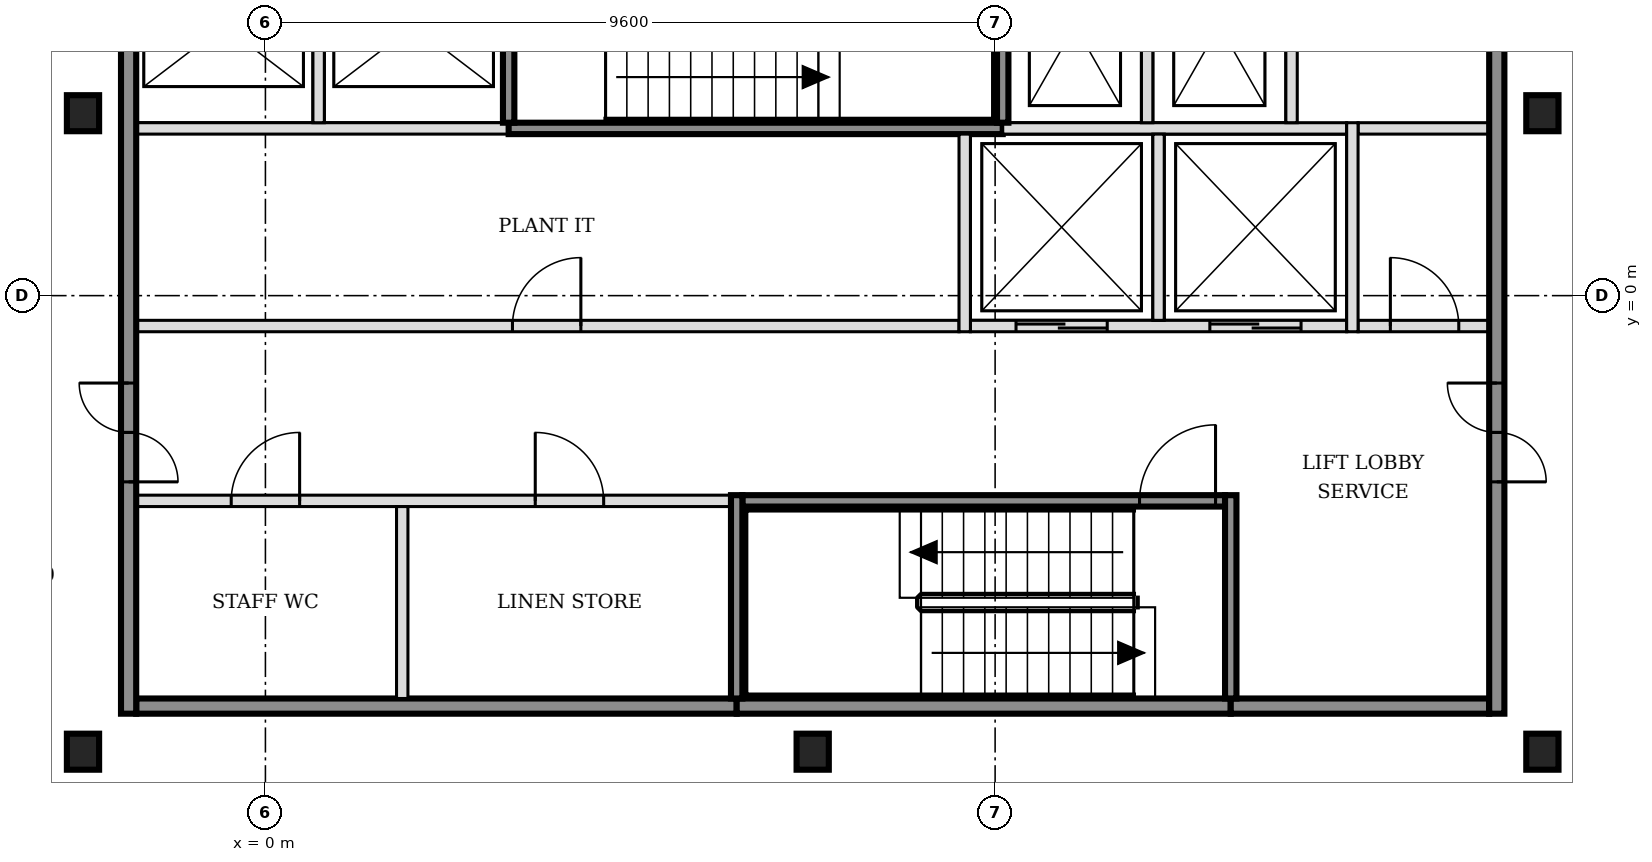
"""IFC4 building model, lengths in metres.
Left out: names, types, materials, properties, quantities, classifications, styles, units other than length and angle.
Written with IfcOpenShell. Run it as: python <this file> out.ifc"""

import sys

from ifc_helpers import new_model, si_unit, direction, frame, frame_2d, origin, origin_2d, place, context, subcontext, project, spatial, rectangle, i_section, extrude, element, fill, save


model = new_model("IFC4")
c1 = context("Model", 3, precision=1e-05, world=origin(), true_north=direction((0.0, 1.0)))
c2 = subcontext(c1, "Body", "Model", "MODEL_VIEW")
j1 = project(units=[si_unit("LENGTHUNIT", "METRE"), si_unit("PLANEANGLEUNIT", "RADIAN")], contexts=[c1])
p1 = place(None, origin())
s1 = spatial("IfcSite", under=j1, at=p1, CompositionType="ELEMENT")
p2 = place(p1, origin())
s2 = spatial("IfcBuilding", under=s1, at=p2, CompositionType="ELEMENT")
p3 = place(p2, frame((0.0, 0.0, 143.4)))
s3 = spatial("IfcBuildingStorey", under=s2, at=p3, CompositionType="ELEMENT", Elevation=143.4)
for number, where, z_axis, x_axis in (
    (1, (-2.4, -6.0, -0.15), (0.0, 0.0, 1.0), (1.0, 0.0, 0.0)),
    (2, (7.2, -6.0, -0.15), (0.0, 0.0, 1.0), (1.0, 0.0, 0.0)),
    (3, (16.8, -6.0, -0.15), (0.0, 0.0, 1.0), (1.0, 0.0, 0.0)),
    (4, (-2.4, 2.4, -0.15), (0.0, 0.0, 1.0), (1.0, 0.0, 0.0)),
    (5, (16.8, 2.4, -0.15), (0.0, 0.0, 1.0), (1.0, 0.0, 0.0)),
):
    element("IfcColumn", number, at=place(p3, frame(where, z_axis=z_axis, x_axis=x_axis)), inside=s3, PredefinedType="COLUMN", context=c2, shape_type="SweptSolid", body=[
        extrude(i_section(OverallWidth=0.424, OverallDepth=0.474, WebThickness=0.048, FlangeThickness=0.077, FilletRadius=0.015, at=origin_2d()), origin(), (0.0, 0.0, 1.0), 3.6),
    ])
p4 = place(p3, frame((-1.7, -5.4, 0.0), z_axis=(0.0, 0.0, 1.0), x_axis=(1.0, 0.0, 0.0)))
e6 = element("IfcWall", 6, at=p4, inside=s3, PredefinedType="SOLIDWALL", context=c2, shape_type="SweptSolid", body=[
    extrude(rectangle(XDim=7.9, YDim=0.2, at=frame_2d((3.95, 0.0))), origin(), (0.0, 0.0, 1.0), 3.45),
])
p5 = place(p3, frame((6.2, -5.4, 0.0), z_axis=(0.0, 0.0, 1.0), x_axis=(1.0, 0.0, 0.0)))
e7 = element("IfcWall", 7, at=p5, inside=s3, PredefinedType="SOLIDWALL", context=c2, shape_type="SweptSolid", body=[
    extrude(rectangle(XDim=6.5, YDim=0.2, at=frame_2d((3.25, 0.0))), origin(), (0.0, 0.0, 1.0), 3.45),
])
p6 = place(p3, frame((12.7, -5.4, 0.0), z_axis=(0.0, 0.0, 1.0), x_axis=(1.0, 0.0, 0.0)))
e8 = element("IfcWall", 8, at=p6, inside=s3, PredefinedType="SOLIDWALL", context=c2, shape_type="SweptSolid", body=[
    extrude(rectangle(XDim=3.4, YDim=0.2, at=frame_2d((1.7, 0.0))), origin(), (0.0, 0.0, 1.0), 3.45),
])
p7 = place(p3, frame((-1.7, -2.7, 0.0), z_axis=(0.0, 0.0, 1.0), x_axis=(1.0, 0.0, 0.0)))
e9 = element("IfcWall", 9, at=p7, inside=s3, PredefinedType="PARTITIONING", context=c2, shape_type="SweptSolid", body=[
    extrude(rectangle(XDim=7.825, YDim=0.15, at=frame_2d((3.913, 0.0))), origin(), (0.0, 0.0, 1.0), 3.45),
])
p8 = place(p7, frame((1.25, 0.0, 0.0)))
e10 = element("IfcOpeningElement", 10, at=p8, cuts=e9, PredefinedType="OPENING", context=c2, shape_type="SweptSolid", body=[
    extrude(rectangle(XDim=0.9, YDim=2.1, at=frame_2d((0.45, 1.05))), frame((0.0, 0.085, 0.0), z_axis=(0.0, -1.0, 0.0), x_axis=(1.0, 0.0, 0.0)), (0.0, 0.0, 1.0), 0.17),
])
p9 = place(p7, frame((5.25, 0.0, 0.0)))
e11 = element("IfcOpeningElement", 11, at=p9, cuts=e9, PredefinedType="OPENING", context=c2, shape_type="SweptSolid", body=[
    extrude(rectangle(XDim=0.9, YDim=2.1, at=frame_2d((0.45, 1.05))), frame((0.0, 0.085, 0.0), z_axis=(0.0, -1.0, 0.0), x_axis=(1.0, 0.0, 0.0)), (0.0, 0.0, 1.0), 0.17),
])
p10 = place(p3, frame((6.275, -2.7, 0.0), z_axis=(0.0, 0.0, 1.0), x_axis=(1.0, 0.0, 0.0)))
e12 = element("IfcWall", 12, at=p10, inside=s3, PredefinedType="SOLIDWALL", context=c2, shape_type="SweptSolid", body=[
    extrude(rectangle(XDim=6.35, YDim=0.15, at=frame_2d((3.175, 0.0))), origin(), (0.0, 0.0, 1.0), 3.45),
])
p11 = place(p10, frame((5.225, 0.0, 0.0)))
e13 = element("IfcOpeningElement", 13, at=p11, cuts=e12, PredefinedType="OPENING", context=c2, shape_type="SweptSolid", body=[
    extrude(rectangle(XDim=1.0, YDim=2.1, at=frame_2d((0.5, 1.05))), frame((0.0, 0.085, 0.0), z_axis=(0.0, -1.0, 0.0), x_axis=(1.0, 0.0, 0.0)), (0.0, 0.0, 1.0), 0.17),
])
p12 = place(p3, frame((-1.7, -0.4, 0.0), z_axis=(0.0, 0.0, 1.0), x_axis=(1.0, 0.0, 0.0)))
e14 = element("IfcWall", 14, at=p12, inside=s3, PredefinedType="PARTITIONING", context=c2, shape_type="SweptSolid", body=[
    extrude(rectangle(XDim=10.825, YDim=0.15, at=frame_2d((5.413, 0.0))), origin(), (0.0, 0.0, 1.0), 3.45),
])
p13 = place(p12, frame((4.95, 0.0, 0.0)))
e15 = element("IfcOpeningElement", 15, at=p13, cuts=e14, PredefinedType="OPENING", context=c2, shape_type="SweptSolid", body=[
    extrude(rectangle(XDim=0.9, YDim=2.1, at=frame_2d((0.45, 1.05))), frame((0.0, 0.085, 0.0), z_axis=(0.0, -1.0, 0.0), x_axis=(1.0, 0.0, 0.0)), (0.0, 0.0, 1.0), 0.17),
])
p14 = place(p3, frame((9.275, -0.4, 0.0), z_axis=(0.0, 0.0, 1.0), x_axis=(1.0, 0.0, 0.0)))
e16 = element("IfcWall", 16, at=p14, inside=s3, PredefinedType="SOLIDWALL", context=c2, shape_type="SweptSolid", body=[
    extrude(rectangle(XDim=4.95, YDim=0.15, at=frame_2d((2.475, 0.0))), origin(), (0.0, 0.0, 1.0), 3.45),
])
p15 = place(p14, frame((0.6, 0.0, 0.0)))
e17 = element("IfcOpeningElement", 17, at=p15, cuts=e16, PredefinedType="OPENING", context=c2, shape_type="SweptSolid", body=[
    extrude(rectangle(XDim=1.2, YDim=2.1, at=frame_2d((0.6, 1.05))), frame((0.0, 0.085, 0.0), z_axis=(0.0, -1.0, 0.0), x_axis=(1.0, 0.0, 0.0)), (0.0, 0.0, 1.0), 0.17),
])
p16 = place(p14, frame((3.15, 0.0, 0.0)))
e18 = element("IfcOpeningElement", 18, at=p16, cuts=e16, PredefinedType="OPENING", context=c2, shape_type="SweptSolid", body=[
    extrude(rectangle(XDim=1.2, YDim=2.1, at=frame_2d((0.6, 1.05))), frame((0.0, 0.085, 0.0), z_axis=(0.0, -1.0, 0.0), x_axis=(1.0, 0.0, 0.0)), (0.0, 0.0, 1.0), 0.17),
])
p17 = place(p3, frame((14.375, -0.4, 0.0), z_axis=(0.0, 0.0, 1.0), x_axis=(1.0, 0.0, 0.0)))
e19 = element("IfcWall", 19, at=p17, inside=s3, PredefinedType="PARTITIONING", context=c2, shape_type="SweptSolid", body=[
    extrude(rectangle(XDim=1.725, YDim=0.15, at=frame_2d((0.863, 0.0))), origin(), (0.0, 0.0, 1.0), 3.45),
])
p18 = place(p17, frame((0.425, 0.0, 0.0)))
e20 = element("IfcOpeningElement", 20, at=p18, cuts=e19, PredefinedType="OPENING", context=c2, shape_type="SweptSolid", body=[
    extrude(rectangle(XDim=0.9, YDim=2.1, at=frame_2d((0.45, 1.05))), frame((0.0, 0.085, 0.0), z_axis=(0.0, -1.0, 0.0), x_axis=(1.0, 0.0, 0.0)), (0.0, 0.0, 1.0), 0.17),
])
p19 = place(p3, frame((-1.7, 2.2, 0.0), z_axis=(0.0, 0.0, 1.0), x_axis=(1.0, 0.0, 0.0)))
e21 = element("IfcWall", 21, at=p19, inside=s3, PredefinedType="SOLIDWALL", context=c2, shape_type="SweptSolid", body=[
    extrude(rectangle(XDim=4.9, YDim=0.15, at=frame_2d((2.45, 0.0))), origin(), (0.0, 0.0, 1.0), 3.45),
])
p20 = place(p3, frame((3.2, 2.2, 0.0), z_axis=(0.0, 0.0, 1.0), x_axis=(1.0, 0.0, 0.0)))
e22 = element("IfcWall", 22, at=p20, inside=s3, PredefinedType="SOLIDWALL", context=c2, shape_type="SweptSolid", body=[
    extrude(rectangle(XDim=6.5, YDim=0.15, at=frame_2d((3.25, 0.0))), origin(), (0.0, 0.0, 1.0), 3.45),
])
p21 = place(p3, frame((9.7, 2.2, 0.0), z_axis=(0.0, 0.0, 1.0), x_axis=(1.0, 0.0, 0.0)))
e23 = element("IfcWall", 23, at=p21, inside=s3, PredefinedType="SOLIDWALL", context=c2, shape_type="SweptSolid", body=[
    extrude(rectangle(XDim=4.525, YDim=0.15, at=frame_2d((2.263, 0.0))), origin(), (0.0, 0.0, 1.0), 3.45),
])
p22 = place(p3, frame((14.375, 2.2, 0.0), z_axis=(0.0, 0.0, 1.0), x_axis=(1.0, 0.0, 0.0)))
e24 = element("IfcWall", 24, at=p22, inside=s3, PredefinedType="PARTITIONING", context=c2, shape_type="SweptSolid", body=[
    extrude(rectangle(XDim=1.725, YDim=0.15, at=frame_2d((0.863, 0.0))), origin(), (0.0, 0.0, 1.0), 3.45),
])
p23 = place(p3, frame((-1.8, -5.5, 0.0), z_axis=(0.0, 0.0, 1.0), x_axis=(0.0, 1.0, 0.0)))
e25 = element("IfcWall", 25, at=p23, inside=s3, PredefinedType="SOLIDWALL", context=c2, shape_type="SweptSolid", body=[
    extrude(rectangle(XDim=15.8, YDim=0.2, at=frame_2d((7.9, 0.0))), origin(), (0.0, 0.0, 1.0), 3.45),
])
p24 = place(p23, frame((3.05, 0.0, 0.0)))
e26 = element("IfcOpeningElement", 26, at=p24, cuts=e25, PredefinedType="OPENING", context=c2, shape_type="SweptSolid", body=[
    extrude(rectangle(XDim=1.3, YDim=2.1, at=frame_2d((0.65, 1.05))), frame((0.0, 0.11, 0.0), z_axis=(0.0, -1.0, 0.0), x_axis=(1.0, 0.0, 0.0)), (0.0, 0.0, 1.0), 0.22),
])
p25 = place(p23, frame((11.45, 0.0, 0.0)))
e27 = element("IfcOpeningElement", 27, at=p25, cuts=e25, PredefinedType="OPENING", context=c2, shape_type="SweptSolid", body=[
    extrude(rectangle(XDim=1.3, YDim=2.1, at=frame_2d((0.65, 1.05))), frame((0.0, 0.11, 0.0), z_axis=(0.0, -1.0, 0.0), x_axis=(1.0, 0.0, 0.0)), (0.0, 0.0, 1.0), 0.22),
])
p26 = place(p3, frame((0.7, 2.275, 0.0), z_axis=(0.0, 0.0, 1.0), x_axis=(0.0, 1.0, 0.0)))
e28 = element("IfcWall", 28, at=p26, inside=s3, PredefinedType="SOLIDWALL", context=c2, shape_type="SweptSolid", body=[
    extrude(rectangle(XDim=2.55, YDim=0.15, at=frame_2d((1.275, 0.0))), origin(), (0.0, 0.0, 1.0), 3.45),
])
p27 = place(p3, frame((1.8, -5.3, 0.0), z_axis=(0.0, 0.0, 1.0), x_axis=(0.0, 1.0, 0.0)))
e29 = element("IfcWall", 29, at=p27, inside=s3, PredefinedType="PARTITIONING", context=c2, shape_type="SweptSolid", body=[
    extrude(rectangle(XDim=2.525, YDim=0.15, at=frame_2d((1.263, 0.0))), origin(), (0.0, 0.0, 1.0), 3.45),
])
p28 = place(p3, frame((3.2, 2.275, 0.0), z_axis=(0.0, 0.0, 1.0), x_axis=(0.0, 1.0, 0.0)))
e30 = element("IfcWall", 30, at=p28, inside=s3, PredefinedType="SOLIDWALL", context=c2, shape_type="SweptSolid", body=[
    extrude(rectangle(XDim=2.55, YDim=0.15, at=frame_2d((1.275, 0.0))), origin(), (0.0, 0.0, 1.0), 3.45),
])
p29 = place(p3, frame((6.2, -5.3, 0.0), z_axis=(0.0, 0.0, 1.0), x_axis=(0.0, 1.0, 0.0)))
e31 = element("IfcWall", 31, at=p29, inside=s3, PredefinedType="SOLIDWALL", context=c2, shape_type="SweptSolid", body=[
    extrude(rectangle(XDim=2.675, YDim=0.15, at=frame_2d((1.337, 0.0))), origin(), (0.0, 0.0, 1.0), 3.45),
])
p30 = place(p3, frame((9.2, -0.475, 0.0), z_axis=(0.0, 0.0, 1.0), x_axis=(0.0, 1.0, 0.0)))
e32 = element("IfcWall", 32, at=p30, inside=s3, PredefinedType="SOLIDWALL", context=c2, shape_type="SweptSolid", body=[
    extrude(rectangle(XDim=2.6, YDim=0.15, at=frame_2d((1.3, 0.0))), origin(), (0.0, 0.0, 1.0), 3.45),
])
for number, where, z_axis, x_axis in (
    (33, (9.7, 2.275, 0.0), (0.0, 0.0, 1.0), (0.0, 1.0, 0.0)),
    (34, (11.6, 2.275, 0.0), (0.0, 0.0, 1.0), (0.0, 1.0, 0.0)),
):
    element("IfcWall", number, at=place(p3, frame(where, z_axis=z_axis, x_axis=x_axis)), inside=s3, PredefinedType="SOLIDWALL", context=c2, shape_type="SweptSolid", body=[
        extrude(rectangle(XDim=2.55, YDim=0.15, at=frame_2d((1.275, 0.0))), origin(), (0.0, 0.0, 1.0), 3.45),
    ])
p31 = place(p3, frame((11.75, -0.325, 0.0), z_axis=(0.0, 0.0, 1.0), x_axis=(0.0, 1.0, 0.0)))
e35 = element("IfcWall", 35, at=p31, inside=s3, PredefinedType="SOLIDWALL", context=c2, shape_type="SweptSolid", body=[
    extrude(rectangle(XDim=2.45, YDim=0.15, at=frame_2d((1.225, 0.0))), origin(), (0.0, 0.0, 1.0), 3.45),
])
p32 = place(p3, frame((12.7, -5.3, 0.0), z_axis=(0.0, 0.0, 1.0), x_axis=(0.0, 1.0, 0.0)))
e36 = element("IfcWall", 36, at=p32, inside=s3, PredefinedType="SOLIDWALL", context=c2, shape_type="SweptSolid", body=[
    extrude(rectangle(XDim=2.675, YDim=0.15, at=frame_2d((1.337, 0.0))), origin(), (0.0, 0.0, 1.0), 3.45),
])
p33 = place(p3, frame((13.5, 2.275, 0.0), z_axis=(0.0, 0.0, 1.0), x_axis=(0.0, 1.0, 0.0)))
e37 = element("IfcWall", 37, at=p33, inside=s3, PredefinedType="SOLIDWALL", context=c2, shape_type="SweptSolid", body=[
    extrude(rectangle(XDim=2.55, YDim=0.15, at=frame_2d((1.275, 0.0))), origin(), (0.0, 0.0, 1.0), 3.45),
])
p34 = place(p3, frame((14.3, -0.475, 0.0), z_axis=(0.0, 0.0, 1.0), x_axis=(0.0, 1.0, 0.0)))
e38 = element("IfcWall", 38, at=p34, inside=s3, PredefinedType="SOLIDWALL", context=c2, shape_type="SweptSolid", body=[
    extrude(rectangle(XDim=2.75, YDim=0.15, at=frame_2d((1.375, 0.0))), origin(), (0.0, 0.0, 1.0), 3.45),
])
p35 = place(p3, frame((16.2, -5.5, 0.0), z_axis=(0.0, 0.0, 1.0), x_axis=(0.0, 1.0, 0.0)))
e39 = element("IfcWall", 39, at=p35, inside=s3, PredefinedType="SOLIDWALL", context=c2, shape_type="SweptSolid", body=[
    extrude(rectangle(XDim=15.8, YDim=0.2, at=frame_2d((7.9, 0.0))), origin(), (0.0, 0.0, 1.0), 3.45),
])
p36 = place(p35, frame((3.05, 0.0, 0.0)))
e40 = element("IfcOpeningElement", 40, at=p36, cuts=e39, PredefinedType="OPENING", context=c2, shape_type="SweptSolid", body=[
    extrude(rectangle(XDim=1.3, YDim=2.1, at=frame_2d((0.65, 1.05))), frame((0.0, 0.11, 0.0), z_axis=(0.0, -1.0, 0.0), x_axis=(1.0, 0.0, 0.0)), (0.0, 0.0, 1.0), 0.22),
])
p37 = place(p35, frame((11.45, 0.0, 0.0)))
e41 = element("IfcOpeningElement", 41, at=p37, cuts=e39, PredefinedType="OPENING", context=c2, shape_type="SweptSolid", body=[
    extrude(rectangle(XDim=1.3, YDim=2.1, at=frame_2d((0.65, 1.05))), frame((0.0, 0.11, 0.0), z_axis=(0.0, -1.0, 0.0), x_axis=(1.0, 0.0, 0.0)), (0.0, 0.0, 1.0), 0.22),
])
p38 = place(p15, origin())
e42 = element("IfcDoor", 42, at=p38, inside=s3, OperationType="DOUBLE_DOOR_SLIDING", PredefinedType="DOOR", context=c2, shape_type="SweptSolid", body=[
    extrude(rectangle(XDim=1.2, YDim=2.1, at=frame_2d((0.6, 1.05))), frame((0.0, 0.025, 0.0), z_axis=(0.0, -1.0, 0.0), x_axis=(1.0, 0.0, 0.0)), (0.0, 0.0, 1.0), 0.05),
])
fill(e17, e42)
p39 = place(p16, origin())
e43 = element("IfcDoor", 43, at=p39, inside=s3, OperationType="DOUBLE_DOOR_SLIDING", PredefinedType="DOOR", context=c2, shape_type="SweptSolid", body=[
    extrude(rectangle(XDim=1.2, YDim=2.1, at=frame_2d((0.6, 1.05))), frame((0.0, 0.025, 0.0), z_axis=(0.0, -1.0, 0.0), x_axis=(1.0, 0.0, 0.0)), (0.0, 0.0, 1.0), 0.05),
])
fill(e18, e43)
p40 = place(p11, origin())
e44 = element("IfcDoor", 44, at=p40, inside=s3, OperationType="SINGLE_SWING_RIGHT", PredefinedType="DOOR", context=c2, shape_type="SweptSolid", body=[
    extrude(rectangle(XDim=1.0, YDim=2.1, at=frame_2d((0.5, 1.05))), frame((0.0, 0.025, 0.0), z_axis=(0.0, -1.0, 0.0), x_axis=(1.0, 0.0, 0.0)), (0.0, 0.0, 1.0), 0.05),
])
fill(e13, e44)
p41 = place(p24, origin())
e45 = element("IfcDoor", 45, at=p41, inside=s3, OperationType="DOUBLE_DOOR_SINGLE_SWING", PredefinedType="DOOR", context=c2, shape_type="SweptSolid", body=[
    extrude(rectangle(XDim=1.3, YDim=2.1, at=frame_2d((0.65, 1.05))), frame((0.0, 0.025, 0.0), z_axis=(0.0, -1.0, 0.0), x_axis=(1.0, 0.0, 0.0)), (0.0, 0.0, 1.0), 0.05),
])
fill(e26, e45)
p42 = place(p36, origin())
e46 = element("IfcDoor", 46, at=p42, inside=s3, OperationType="DOUBLE_DOOR_SINGLE_SWING", PredefinedType="DOOR", context=c2, shape_type="SweptSolid", body=[
    extrude(rectangle(XDim=1.3, YDim=2.1, at=frame_2d((0.65, 1.05))), frame((0.0, 0.025, 0.0), z_axis=(0.0, -1.0, 0.0), x_axis=(1.0, 0.0, 0.0)), (0.0, 0.0, 1.0), 0.05),
])
fill(e40, e46)
p43 = place(p18, origin())
e47 = element("IfcDoor", 47, at=p43, inside=s3, OperationType="SINGLE_SWING_LEFT", PredefinedType="DOOR", context=c2, shape_type="SweptSolid", body=[
    extrude(rectangle(XDim=0.9, YDim=2.1, at=frame_2d((0.45, 1.05))), frame((0.0, 0.025, 0.0), z_axis=(0.0, -1.0, 0.0), x_axis=(1.0, 0.0, 0.0)), (0.0, 0.0, 1.0), 0.05),
])
fill(e20, e47)
p44 = place(p8, origin())
e48 = element("IfcDoor", 48, at=p44, inside=s3, OperationType="SINGLE_SWING_RIGHT", PredefinedType="DOOR", context=c2, shape_type="SweptSolid", body=[
    extrude(rectangle(XDim=0.9, YDim=2.1, at=frame_2d((0.45, 1.05))), frame((0.0, 0.025, 0.0), z_axis=(0.0, -1.0, 0.0), x_axis=(1.0, 0.0, 0.0)), (0.0, 0.0, 1.0), 0.05),
])
fill(e10, e48)
p45 = place(p9, origin())
e49 = element("IfcDoor", 49, at=p45, inside=s3, OperationType="SINGLE_SWING_LEFT", PredefinedType="DOOR", context=c2, shape_type="SweptSolid", body=[
    extrude(rectangle(XDim=0.9, YDim=2.1, at=frame_2d((0.45, 1.05))), frame((0.0, 0.025, 0.0), z_axis=(0.0, -1.0, 0.0), x_axis=(1.0, 0.0, 0.0)), (0.0, 0.0, 1.0), 0.05),
])
fill(e11, e49)
p46 = place(p13, origin())
e50 = element("IfcDoor", 50, at=p46, inside=s3, OperationType="SINGLE_SWING_RIGHT", PredefinedType="DOOR", context=c2, shape_type="SweptSolid", body=[
    extrude(rectangle(XDim=0.9, YDim=2.1, at=frame_2d((0.45, 1.05))), frame((0.0, 0.025, 0.0), z_axis=(0.0, -1.0, 0.0), x_axis=(1.0, 0.0, 0.0)), (0.0, 0.0, 1.0), 0.05),
])
fill(e15, e50)
save(model, sys.argv[1])
